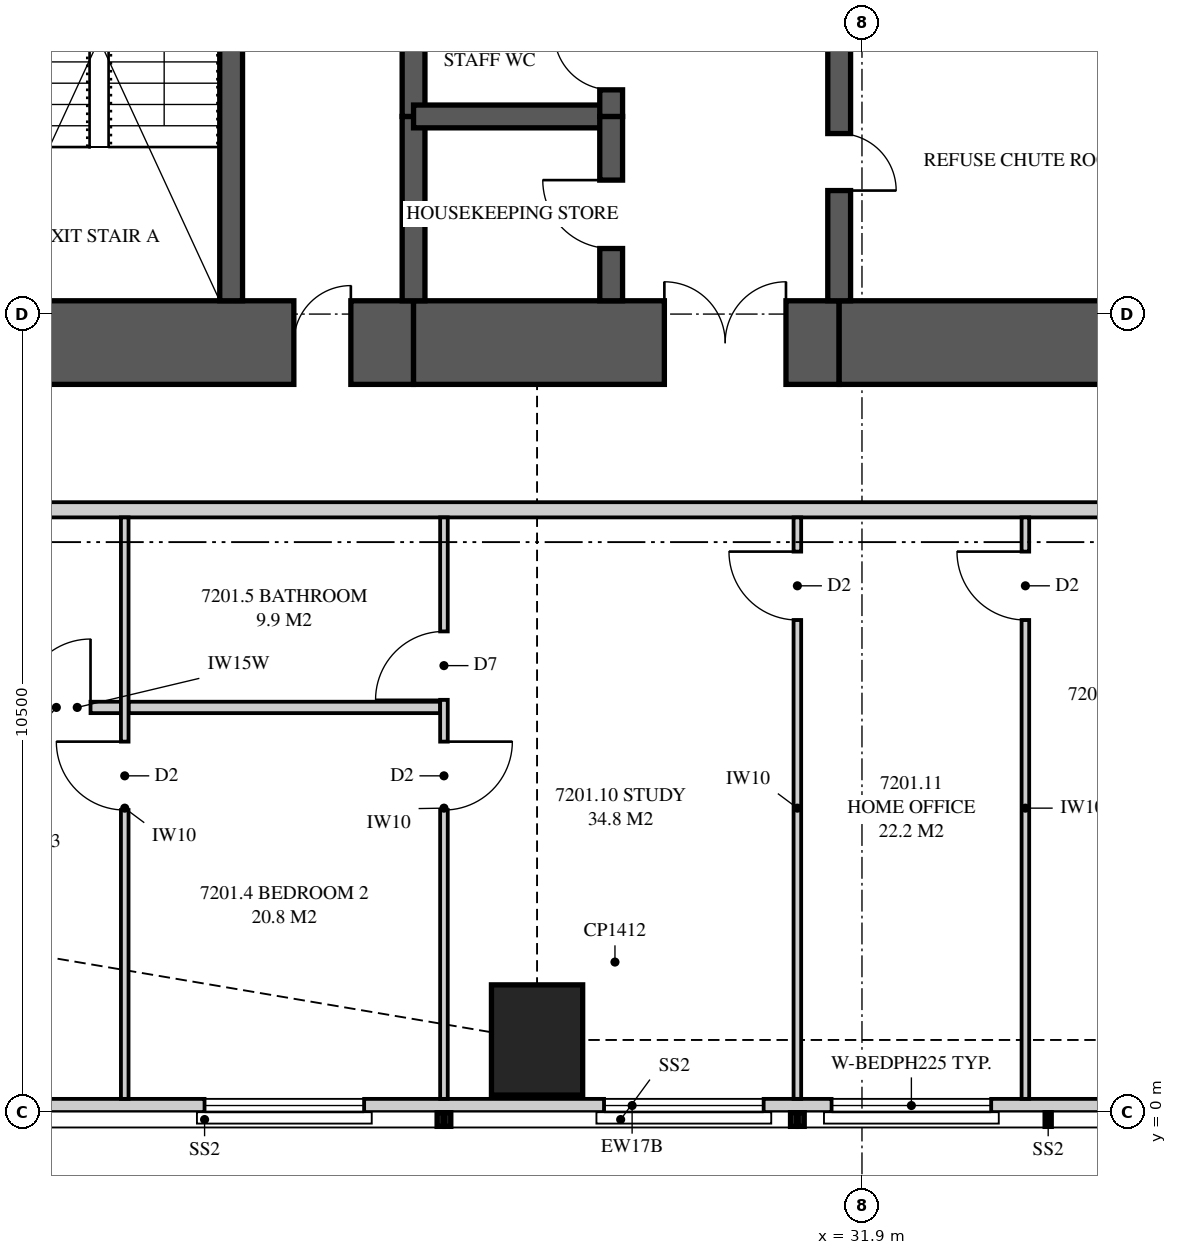
"""IFC4 building model, lengths in metres.
Left out: names, types, materials, properties, quantities, classifications, styles, units other than length and angle.
Written with IfcOpenShell. Run it as: python <this file> out.ifc"""

import sys

from ifc_helpers import new_model, si_unit, direction, frame, frame_2d, origin, origin_2d, place, context, subcontext, project, spatial, polyline, rectangle, outline, extrude, element, fill, save


model = new_model("IFC4")
c1 = context("Model", 3, precision=1e-05, world=origin(), true_north=direction((0.0, 1.0)))
c2 = subcontext(c1, "Body", "Model", "MODEL_VIEW")
j1 = project(units=[si_unit("LENGTHUNIT", "METRE"), si_unit("PLANEANGLEUNIT", "RADIAN")], contexts=[c1])
p1 = place(None, origin())
s1 = spatial("IfcSite", under=j1, at=p1, CompositionType="ELEMENT")
p2 = place(p1, origin())
s2 = spatial("IfcBuilding", under=s1, at=p2, CompositionType="ELEMENT")
p3 = place(p2, frame((0.0, 0.0, 263.85)))
s3 = spatial("IfcBuildingStorey", under=s2, at=p3, CompositionType="ELEMENT", Elevation=263.85)
p4 = place(p3, frame((27.625, 0.95, 0.0), z_axis=(0.0, 0.0, 1.0), x_axis=(0.0, 1.0, 0.0)))
e1 = element("IfcColumn", 1, at=p4, inside=s3, PredefinedType="COLUMN", context=c2, shape_type="SweptSolid", body=[
    extrude(rectangle(XDim=1.45, YDim=1.2, at=origin_2d()), origin(), (0.0, 0.0, 1.0), 3.9),
])
p5 = place(p3, frame((19.725, 10.125, 0.0), z_axis=(0.0, 0.0, 1.0), x_axis=(1.0, 0.0, 0.0)))
e2 = element("IfcWall", 2, at=p5, inside=s3, PredefinedType="SHEAR", context=c2, shape_type="SweptSolid", body=[
    extrude(rectangle(XDim=6.275, YDim=1.1, at=frame_2d((3.137, 0.0))), origin(), (0.0, 0.0, 1.0), 3.9),
])
p6 = place(p5, frame((4.7, 0.0, 0.0)))
e3 = element("IfcOpeningElement", 3, at=p6, cuts=e2, PredefinedType="OPENING", context=c2, shape_type="SweptSolid", body=[
    extrude(rectangle(XDim=0.75, YDim=2.1, at=frame_2d((0.375, 1.05))), frame((0.0, 0.56, 0.0), z_axis=(0.0, -1.0, 0.0), x_axis=(1.0, 0.0, 0.0)), (0.0, 0.0, 1.0), 1.12),
])
p7 = place(p3, frame((26.0, 10.125, 0.0), z_axis=(0.0, 0.0, 1.0), x_axis=(1.0, 0.0, 0.0)))
e4 = element("IfcWall", 4, at=p7, inside=s3, PredefinedType="SHEAR", context=c2, shape_type="SweptSolid", body=[
    extrude(rectangle(XDim=5.6, YDim=1.1, at=frame_2d((2.8, 0.0))), origin(), (0.0, 0.0, 1.0), 3.9),
])
p8 = place(p7, frame((3.3, 0.0, 0.0)))
e5 = element("IfcOpeningElement", 5, at=p8, cuts=e4, PredefinedType="OPENING", context=c2, shape_type="SweptSolid", body=[
    extrude(rectangle(XDim=1.6, YDim=2.1, at=frame_2d((0.8, 1.05))), frame((0.0, 0.56, 0.0), z_axis=(0.0, -1.0, 0.0), x_axis=(1.0, 0.0, 0.0)), (0.0, 0.0, 1.0), 1.12),
])
p9 = place(p3, frame((31.6, 10.125, 0.0), z_axis=(0.0, 0.0, 1.0), x_axis=(1.0, 0.0, 0.0)))
e6 = element("IfcWall", 6, at=p9, inside=s3, PredefinedType="SHEAR", context=c2, shape_type="SweptSolid", body=[
    extrude(rectangle(XDim=4.3, YDim=1.1, at=frame_2d((2.15, 0.0))), origin(), (0.0, 0.0, 1.0), 3.9),
])
p10 = place(p3, frame((23.6, 10.675, 0.0), z_axis=(0.0, 0.0, 1.0), x_axis=(0.0, 1.0, 0.0)))
e7 = element("IfcWall", 7, at=p10, inside=s3, PredefinedType="SHEAR", context=c2, shape_type="SweptSolid", body=[
    extrude(rectangle(XDim=7.025, YDim=0.3, at=frame_2d((3.512, 0.0))), origin(), (0.0, 0.0, 1.0), 3.9),
])
p11 = place(p3, frame((26.0, 10.675, 0.0), z_axis=(0.0, 0.0, 1.0), x_axis=(0.0, 1.0, 0.0)))
e8 = element("IfcWall", 8, at=p11, inside=s3, PredefinedType="SHEAR", context=c2, shape_type="SweptSolid", body=[
    extrude(rectangle(XDim=2.425, YDim=0.3, at=frame_2d((1.212, 0.0))), origin(), (0.0, 0.0, 1.0), 3.9),
])
p12 = place(p3, frame((26.0, 13.1, 0.0), z_axis=(0.0, 0.0, 1.0), x_axis=(0.0, 1.0, 0.0)))
e9 = element("IfcWall", 9, at=p12, inside=s3, PredefinedType="SHEAR", context=c2, shape_type="SweptSolid", body=[
    extrude(rectangle(XDim=2.6, YDim=0.3, at=frame_2d((1.3, 0.0))), origin(), (0.0, 0.0, 1.0), 3.9),
])
p13 = place(p3, frame((28.6, 10.675, 0.0), z_axis=(0.0, 0.0, 1.0), x_axis=(0.0, 1.0, 0.0)))
e10 = element("IfcWall", 10, at=p13, inside=s3, PredefinedType="SHEAR", context=c2, shape_type="SweptSolid", body=[
    extrude(rectangle(XDim=2.425, YDim=0.3, at=frame_2d((1.212, 0.0))), origin(), (0.0, 0.0, 1.0), 3.9),
])
p14 = place(p13, frame((0.688, 0.0, 0.0)))
e11 = element("IfcOpeningElement", 11, at=p14, cuts=e10, PredefinedType="OPENING", context=c2, shape_type="SweptSolid", body=[
    extrude(rectangle(XDim=0.9, YDim=2.1, at=frame_2d((0.45, 1.05))), frame((0.0, 0.16, 0.0), z_axis=(0.0, -1.0, 0.0), x_axis=(1.0, 0.0, 0.0)), (0.0, 0.0, 1.0), 0.32),
])
p15 = place(p3, frame((28.6, 13.1, 0.0), z_axis=(0.0, 0.0, 1.0), x_axis=(0.0, 1.0, 0.0)))
e12 = element("IfcWall", 12, at=p15, inside=s3, PredefinedType="SHEAR", context=c2, shape_type="SweptSolid", body=[
    extrude(rectangle(XDim=2.6, YDim=0.3, at=frame_2d((1.3, 0.0))), origin(), (0.0, 0.0, 1.0), 3.9),
])
p16 = place(p15, frame((0.35, 0.0, 0.0)))
e13 = element("IfcOpeningElement", 13, at=p16, cuts=e12, PredefinedType="OPENING", context=c2, shape_type="SweptSolid", body=[
    extrude(rectangle(XDim=0.75, YDim=2.1, at=frame_2d((0.375, 1.05))), frame((0.0, 0.16, 0.0), z_axis=(0.0, -1.0, 0.0), x_axis=(1.0, 0.0, 0.0)), (0.0, 0.0, 1.0), 0.32),
])
p17 = place(p15, frame((1.5, 0.0, 0.0)))
e14 = element("IfcOpeningElement", 14, at=p17, cuts=e12, PredefinedType="OPENING", context=c2, shape_type="SweptSolid", body=[
    extrude(rectangle(XDim=0.75, YDim=2.1, at=frame_2d((0.375, 1.05))), frame((0.0, 0.16, 0.0), z_axis=(0.0, -1.0, 0.0), x_axis=(1.0, 0.0, 0.0)), (0.0, 0.0, 1.0), 0.32),
])
p18 = place(p3, frame((31.6, 10.675, 0.0), z_axis=(0.0, 0.0, 1.0), x_axis=(0.0, 1.0, 0.0)))
e15 = element("IfcWall", 15, at=p18, inside=s3, PredefinedType="SHEAR", context=c2, shape_type="SweptSolid", body=[
    extrude(rectangle(XDim=3.825, YDim=0.3, at=frame_2d((1.913, 0.0))), origin(), (0.0, 0.0, 1.0), 3.9),
])
p19 = place(p18, frame((1.45, 0.0, 0.0)))
e16 = element("IfcOpeningElement", 16, at=p19, cuts=e15, PredefinedType="OPENING", context=c2, shape_type="SweptSolid", body=[
    extrude(rectangle(XDim=0.75, YDim=2.1, at=frame_2d((0.375, 1.05))), frame((0.0, 0.16, 0.0), z_axis=(0.0, -1.0, 0.0), x_axis=(1.0, 0.0, 0.0)), (0.0, 0.0, 1.0), 0.32),
])
p20 = place(p3, frame((26.0, 13.1, 0.0), z_axis=(0.0, 0.0, 1.0), x_axis=(1.0, 0.0, 0.0)))
e17 = element("IfcWall", 17, at=p20, inside=s3, PredefinedType="SHEAR", context=c2, shape_type="SweptSolid", body=[
    extrude(rectangle(XDim=2.6, YDim=0.3, at=frame_2d((1.3, 0.0))), origin(), (0.0, 0.0, 1.0), 3.9),
])
p21 = place(p3, frame((19.851, 0.087, 0.0), z_axis=(0.0, 0.0, 1.0), x_axis=(1.0, 0.0, 0.0)))
e18 = element("IfcWall", 18, at=p21, inside=s3, PredefinedType="SOLIDWALL", context=c2, shape_type="SweptSolid", body=[
    extrude(outline(polyline([(0.0, 0.0), (18.049, 0.0), (18.049, 2.7), (7.774, 2.7), (7.774, 3.62), (7.642, 3.62), (7.642, 2.7), (7.559, 2.7), (7.559, 3.62), (0.0, 3.62), (0.0, 0.0)])), frame((0.0, 0.087, 0.0), z_axis=(0.0, -1.0, 0.0), x_axis=(1.0, 0.0, 0.0)), (0.0, 0.0, 1.0), 0.175),
])
p22 = place(p21, frame((3.399, 0.0, 0.4)))
e19 = element("IfcOpeningElement", 19, at=p22, cuts=e18, PredefinedType="OPENING", context=c2, shape_type="SweptSolid", body=[
    extrude(rectangle(XDim=2.1, YDim=2.25, at=frame_2d((1.05, 1.125))), frame((0.0, 0.097, 0.0), z_axis=(0.0, -1.0, 0.0), x_axis=(1.0, 0.0, 0.0)), (0.0, 0.0, 1.0), 0.195),
])
p23 = place(p21, frame((8.655, 0.0, 0.4)))
e20 = element("IfcOpeningElement", 20, at=p23, cuts=e18, PredefinedType="OPENING", context=c2, shape_type="SweptSolid", body=[
    extrude(rectangle(XDim=2.1, YDim=2.25, at=frame_2d((1.05, 1.125))), frame((0.0, 0.097, 0.0), z_axis=(0.0, -1.0, 0.0), x_axis=(1.0, 0.0, 0.0)), (0.0, 0.0, 1.0), 0.195),
])
p24 = place(p21, frame((11.649, 0.0, 0.4)))
e21 = element("IfcOpeningElement", 21, at=p24, cuts=e18, PredefinedType="OPENING", context=c2, shape_type="SweptSolid", body=[
    extrude(rectangle(XDim=2.1, YDim=2.25, at=frame_2d((1.05, 1.125))), frame((0.0, 0.097, 0.0), z_axis=(0.0, -1.0, 0.0), x_axis=(1.0, 0.0, 0.0)), (0.0, 0.0, 1.0), 0.195),
])
p25 = place(p3, frame((18.0, 7.925, 0.0), z_axis=(0.0, 0.0, 1.0), x_axis=(1.0, 0.0, 0.0)))
e22 = element("IfcWall", 22, at=p25, inside=s3, PredefinedType="PARTITIONING", context=c2, shape_type="SweptSolid", body=[
    extrude(outline(polyline([(0.0, 0.0), (27.875, 0.0), (27.875, 3.62), (27.875, 3.02), (27.565, 3.02), (27.565, 3.62), (20.56, 3.62), (20.56, 3.02), (17.94, 3.02), (17.94, 3.62), (10.935, 3.62), (10.935, 3.02), (8.315, 3.02), (8.315, 3.62), (3.517, 3.62), (3.517, 3.02), (1.839, 3.02), (1.839, 2.7), (0.0, 2.7), (0.0, 3.62), (0.0, 0.0)])), frame((0.0, 0.1, 0.0), z_axis=(0.0, -1.0, 0.0), x_axis=(1.0, 0.0, 0.0)), (0.0, 0.0, 1.0), 0.2),
])
p26 = place(p25, frame((18.75, 0.0, 0.0)))
e23 = element("IfcOpeningElement", 23, at=p26, cuts=e22, PredefinedType="OPENING", context=c2, shape_type="SweptSolid", body=[
    extrude(rectangle(XDim=1.05, YDim=2.2, at=frame_2d((0.525, 1.1))), frame((0.0, 0.11, 0.0), z_axis=(0.0, -1.0, 0.0), x_axis=(1.0, 0.0, 0.0)), (0.0, 0.0, 1.0), 0.22),
])
p27 = place(p3, frame((22.2, 0.175, 0.0), z_axis=(0.0, 0.0, 1.0), x_axis=(0.0, 1.0, 0.0)))
e24 = element("IfcWall", 24, at=p27, inside=s3, PredefinedType="PARTITIONING", context=c2, shape_type="SweptSolid", body=[
    extrude(outline(polyline([(0.0, 0.0), (7.65, 0.0), (7.65, 3.62), (2.567, 3.62), (2.567, 2.7), (0.822, 2.7), (0.822, 3.62), (0.0, 3.62), (0.0, 0.0)])), frame((0.0, 0.05, 0.0), z_axis=(0.0, -1.0, 0.0), x_axis=(1.0, 0.0, 0.0)), (0.0, 0.0, 1.0), 0.1),
])
p28 = place(p27, frame((3.8, 0.0, 0.0)))
e25 = element("IfcOpeningElement", 25, at=p28, cuts=e24, PredefinedType="OPENING", context=c2, shape_type="SweptSolid", body=[
    extrude(rectangle(XDim=0.9, YDim=2.1, at=frame_2d((0.45, 1.05))), frame((0.0, 0.06, 0.0), z_axis=(0.0, -1.0, 0.0), x_axis=(1.0, 0.0, 0.0)), (0.0, 0.0, 1.0), 0.12),
])
p29 = place(p3, frame((26.4, 0.175, 0.0), z_axis=(0.0, 0.0, 1.0), x_axis=(0.0, 1.0, 0.0)))
e26 = element("IfcWall", 26, at=p29, inside=s3, PredefinedType="PARTITIONING", context=c2, shape_type="SweptSolid", body=[
    extrude(outline(polyline([(0.0, 0.0), (7.65, 0.0), (7.65, 3.62), (7.65, 3.02), (1.855, 3.02), (1.855, 2.7), (0.11, 2.7), (0.11, 3.62), (0.0, 3.62), (0.0, 0.0)])), frame((0.0, 0.05, 0.0), z_axis=(0.0, -1.0, 0.0), x_axis=(1.0, 0.0, 0.0)), (0.0, 0.0, 1.0), 0.1),
])
p30 = place(p29, frame((3.8, 0.0, 0.0)))
e27 = element("IfcOpeningElement", 27, at=p30, cuts=e26, PredefinedType="OPENING", context=c2, shape_type="SweptSolid", body=[
    extrude(rectangle(XDim=0.9, YDim=2.1, at=frame_2d((0.45, 1.05))), frame((0.0, 0.06, 0.0), z_axis=(0.0, -1.0, 0.0), x_axis=(1.0, 0.0, 0.0)), (0.0, 0.0, 1.0), 0.12),
])
p31 = place(p29, frame((5.25, 0.0, 0.0)))
e28 = element("IfcOpeningElement", 28, at=p31, cuts=e26, PredefinedType="OPENING", context=c2, shape_type="SweptSolid", body=[
    extrude(rectangle(XDim=0.9, YDim=2.1, at=frame_2d((0.45, 1.05))), frame((0.0, 0.06, 0.0), z_axis=(0.0, -1.0, 0.0), x_axis=(1.0, 0.0, 0.0)), (0.0, 0.0, 1.0), 0.12),
])
p32 = place(p3, frame((16.8, 5.325, 0.0), z_axis=(0.0, 0.0, 1.0), x_axis=(1.0, 0.0, 0.0)))
e29 = element("IfcWall", 29, at=p32, inside=s3, PredefinedType="PLUMBINGWALL", context=c2, shape_type="SweptSolid", body=[
    extrude(outline(polyline([(0.0, 0.0), (5.35, 0.0), (5.35, 3.62), (4.692, 3.62), (4.692, 3.02), (3.605, 3.02), (3.605, 2.7), (1.79, 2.7), (1.79, 3.62), (0.0, 3.62), (0.0, 0.0)])), frame((0.0, 0.075, 0.0), z_axis=(0.0, -1.0, 0.0), x_axis=(1.0, 0.0, 0.0)), (0.0, 0.0, 1.0), 0.15),
])
p33 = place(p32, frame((4.05, 0.0, 0.0)))
e30 = element("IfcOpeningElement", 30, at=p33, cuts=e29, PredefinedType="OPENING", context=c2, shape_type="SweptSolid", body=[
    extrude(rectangle(XDim=0.9, YDim=2.1, at=frame_2d((0.45, 1.05))), frame((0.0, 0.085, 0.0), z_axis=(0.0, -1.0, 0.0), x_axis=(1.0, 0.0, 0.0)), (0.0, 0.0, 1.0), 0.17),
])
p34 = place(p3, frame((22.25, 5.325, 0.0), z_axis=(0.0, 0.0, 1.0), x_axis=(1.0, 0.0, 0.0)))
e31 = element("IfcWall", 31, at=p34, inside=s3, PredefinedType="PLUMBINGWALL", context=c2, shape_type="SweptSolid", body=[
    extrude(outline(polyline([(0.0, 0.0), (4.1, 0.0), (4.1, 3.62), (4.1, 3.02), (4.09, 3.02), (4.09, 3.62), (0.0, 3.62), (0.0, 0.0)])), frame((0.0, 0.075, 0.0), z_axis=(0.0, -1.0, 0.0), x_axis=(1.0, 0.0, 0.0)), (0.0, 0.0, 1.0), 0.15),
])
p35 = place(p3, frame((31.05, 0.175, 0.0), z_axis=(0.0, 0.0, 1.0), x_axis=(0.0, 1.0, 0.0)))
e32 = element("IfcWall", 32, at=p35, inside=s3, PredefinedType="PARTITIONING", context=c2, shape_type="SweptSolid", body=[
    extrude(outline(polyline([(0.0, 0.0), (7.65, 0.0), (7.65, 3.62), (1.635, 3.62), (1.635, 2.7), (0.0, 2.7), (0.0, 3.62), (0.0, 0.0)])), frame((0.0, 0.05, 0.0), z_axis=(0.0, -1.0, 0.0), x_axis=(1.0, 0.0, 0.0)), (0.0, 0.0, 1.0), 0.1),
])
p36 = place(p35, frame((6.3, 0.0, 0.0)))
e33 = element("IfcOpeningElement", 33, at=p36, cuts=e32, PredefinedType="OPENING", context=c2, shape_type="SweptSolid", body=[
    extrude(rectangle(XDim=0.9, YDim=2.1, at=frame_2d((0.45, 1.05))), frame((0.0, 0.06, 0.0), z_axis=(0.0, -1.0, 0.0), x_axis=(1.0, 0.0, 0.0)), (0.0, 0.0, 1.0), 0.12),
])
p37 = place(p3, frame((34.05, 0.175, 0.0), z_axis=(0.0, 0.0, 1.0), x_axis=(0.0, 1.0, 0.0)))
e34 = element("IfcWall", 34, at=p37, inside=s3, PredefinedType="PARTITIONING", context=c2, shape_type="SweptSolid", body=[
    extrude(outline(polyline([(0.0, 0.0), (7.65, 0.0), (7.65, 3.62), (1.635, 3.62), (1.635, 2.7), (0.0, 2.7), (0.0, 3.62), (0.0, 0.0)])), frame((0.0, 0.05, 0.0), z_axis=(0.0, -1.0, 0.0), x_axis=(1.0, 0.0, 0.0)), (0.0, 0.0, 1.0), 0.1),
])
p38 = place(p37, frame((6.3, 0.0, 0.0)))
e35 = element("IfcOpeningElement", 35, at=p38, cuts=e34, PredefinedType="OPENING", context=c2, shape_type="SweptSolid", body=[
    extrude(rectangle(XDim=0.9, YDim=2.1, at=frame_2d((0.45, 1.05))), frame((0.0, 0.06, 0.0), z_axis=(0.0, -1.0, 0.0), x_axis=(1.0, 0.0, 0.0)), (0.0, 0.0, 1.0), 0.12),
])
p39 = place(p22, origin())
e36 = element("IfcWindow", 36, at=p39, inside=s3, PartitioningType="SINGLE_PANEL", PredefinedType="WINDOW", context=c2, shape_type="SweptSolid", body=[
    extrude(rectangle(XDim=2.1, YDim=2.25, at=frame_2d((1.05, 1.125))), frame((0.0, 0.03, 0.0), z_axis=(0.0, -1.0, 0.0), x_axis=(1.0, 0.0, 0.0)), (0.0, 0.0, 1.0), 0.06),
])
fill(e19, e36)
p40 = place(p23, origin())
e37 = element("IfcWindow", 37, at=p40, inside=s3, PartitioningType="SINGLE_PANEL", PredefinedType="WINDOW", context=c2, shape_type="SweptSolid", body=[
    extrude(rectangle(XDim=2.1, YDim=2.25, at=frame_2d((1.05, 1.125))), frame((0.0, 0.03, 0.0), z_axis=(0.0, -1.0, 0.0), x_axis=(1.0, 0.0, 0.0)), (0.0, 0.0, 1.0), 0.06),
])
fill(e20, e37)
p41 = place(p24, origin())
e38 = element("IfcWindow", 38, at=p41, inside=s3, PartitioningType="SINGLE_PANEL", PredefinedType="WINDOW", context=c2, shape_type="SweptSolid", body=[
    extrude(rectangle(XDim=2.1, YDim=2.25, at=frame_2d((1.05, 1.125))), frame((0.0, 0.03, 0.0), z_axis=(0.0, -1.0, 0.0), x_axis=(1.0, 0.0, 0.0)), (0.0, 0.0, 1.0), 0.06),
])
fill(e21, e38)
p42 = place(p28, origin())
e39 = element("IfcDoor", 39, at=p42, inside=s3, OperationType="SINGLE_SWING_RIGHT", PredefinedType="DOOR", context=c2, shape_type="SweptSolid", body=[
    extrude(rectangle(XDim=0.9, YDim=2.1, at=frame_2d((0.45, 1.05))), frame((0.0, 0.025, 0.0), z_axis=(0.0, -1.0, 0.0), x_axis=(1.0, 0.0, 0.0)), (0.0, 0.0, 1.0), 0.05),
])
fill(e25, e39)
p43 = place(p33, origin())
e40 = element("IfcDoor", 40, at=p43, inside=s3, OperationType="SINGLE_SWING_RIGHT", PredefinedType="DOOR", context=c2, shape_type="SweptSolid", body=[
    extrude(rectangle(XDim=0.9, YDim=2.1, at=frame_2d((0.45, 1.05))), frame((0.0, 0.025, 0.0), z_axis=(0.0, -1.0, 0.0), x_axis=(1.0, 0.0, 0.0)), (0.0, 0.0, 1.0), 0.05),
])
fill(e30, e40)
p44 = place(p30, frame((0.9, 0.0, 0.0), z_axis=(0.0, 0.0, 1.0), x_axis=(-1.0, 0.0, 0.0)))
e41 = element("IfcDoor", 41, at=p44, inside=s3, OperationType="SINGLE_SWING_LEFT", PredefinedType="DOOR", context=c2, shape_type="SweptSolid", body=[
    extrude(rectangle(XDim=0.9, YDim=2.1, at=frame_2d((0.45, 1.05))), frame((0.0, 0.025, 0.0), z_axis=(0.0, -1.0, 0.0), x_axis=(1.0, 0.0, 0.0)), (0.0, 0.0, 1.0), 0.05),
])
fill(e27, e41)
p45 = place(p31, origin())
e42 = element("IfcDoor", 42, at=p45, inside=s3, OperationType="SINGLE_SWING_LEFT", PredefinedType="DOOR", context=c2, shape_type="SweptSolid", body=[
    extrude(rectangle(XDim=0.9, YDim=2.1, at=frame_2d((0.45, 1.05))), frame((0.0, 0.025, 0.0), z_axis=(0.0, -1.0, 0.0), x_axis=(1.0, 0.0, 0.0)), (0.0, 0.0, 1.0), 0.05),
])
fill(e28, e42)
p46 = place(p36, origin())
e43 = element("IfcDoor", 43, at=p46, inside=s3, OperationType="SINGLE_SWING_RIGHT", PredefinedType="DOOR", context=c2, shape_type="SweptSolid", body=[
    extrude(rectangle(XDim=0.9, YDim=2.1, at=frame_2d((0.45, 1.05))), frame((0.0, 0.025, 0.0), z_axis=(0.0, -1.0, 0.0), x_axis=(1.0, 0.0, 0.0)), (0.0, 0.0, 1.0), 0.05),
])
fill(e33, e43)
p47 = place(p38, origin())
e44 = element("IfcDoor", 44, at=p47, inside=s3, OperationType="SINGLE_SWING_RIGHT", PredefinedType="DOOR", context=c2, shape_type="SweptSolid", body=[
    extrude(rectangle(XDim=0.9, YDim=2.1, at=frame_2d((0.45, 1.05))), frame((0.0, 0.025, 0.0), z_axis=(0.0, -1.0, 0.0), x_axis=(1.0, 0.0, 0.0)), (0.0, 0.0, 1.0), 0.05),
])
fill(e35, e44)
p48 = place(p14, origin())
e45 = element("IfcDoor", 45, at=p48, inside=s3, OperationType="SINGLE_SWING_RIGHT", PredefinedType="DOOR", context=c2, shape_type="SweptSolid", body=[
    extrude(rectangle(XDim=0.9, YDim=2.1, at=frame_2d((0.45, 1.05))), frame((0.0, 0.025, 0.0), z_axis=(0.0, -1.0, 0.0), x_axis=(1.0, 0.0, 0.0)), (0.0, 0.0, 1.0), 0.05),
])
fill(e11, e45)
p49 = place(p16, origin())
e46 = element("IfcDoor", 46, at=p49, inside=s3, OperationType="SINGLE_SWING_RIGHT", PredefinedType="DOOR", context=c2, shape_type="SweptSolid", body=[
    extrude(rectangle(XDim=0.75, YDim=2.1, at=frame_2d((0.375, 1.05))), frame((0.0, 0.025, 0.0), z_axis=(0.0, -1.0, 0.0), x_axis=(1.0, 0.0, 0.0)), (0.0, 0.0, 1.0), 0.05),
])
fill(e13, e46)
p50 = place(p8, origin())
e47 = element("IfcDoor", 47, at=p50, inside=s3, OperationType="DOUBLE_DOOR_SINGLE_SWING", PredefinedType="DOOR", context=c2, shape_type="SweptSolid", body=[
    extrude(rectangle(XDim=1.6, YDim=2.1, at=frame_2d((0.8, 1.05))), frame((0.0, 0.025, 0.0), z_axis=(0.0, -1.0, 0.0), x_axis=(1.0, 0.0, 0.0)), (0.0, 0.0, 1.0), 0.05),
])
fill(e5, e47)
p51 = place(p19, frame((0.75, 0.0, 0.0), z_axis=(0.0, 0.0, 1.0), x_axis=(-1.0, 0.0, 0.0)))
e48 = element("IfcDoor", 48, at=p51, inside=s3, OperationType="SINGLE_SWING_RIGHT", PredefinedType="DOOR", context=c2, shape_type="SweptSolid", body=[
    extrude(rectangle(XDim=0.75, YDim=2.1, at=frame_2d((0.375, 1.05))), frame((0.0, 0.025, 0.0), z_axis=(0.0, -1.0, 0.0), x_axis=(1.0, 0.0, 0.0)), (0.0, 0.0, 1.0), 0.05),
])
fill(e16, e48)
p52 = place(p6, origin())
e49 = element("IfcDoor", 49, at=p52, inside=s3, OperationType="SINGLE_SWING_RIGHT", PredefinedType="DOOR", context=c2, shape_type="SweptSolid", body=[
    extrude(rectangle(XDim=0.75, YDim=2.1, at=frame_2d((0.375, 1.05))), frame((0.0, 0.025, 0.0), z_axis=(0.0, -1.0, 0.0), x_axis=(1.0, 0.0, 0.0)), (0.0, 0.0, 1.0), 0.05),
])
fill(e3, e49)
save(model, sys.argv[1])
